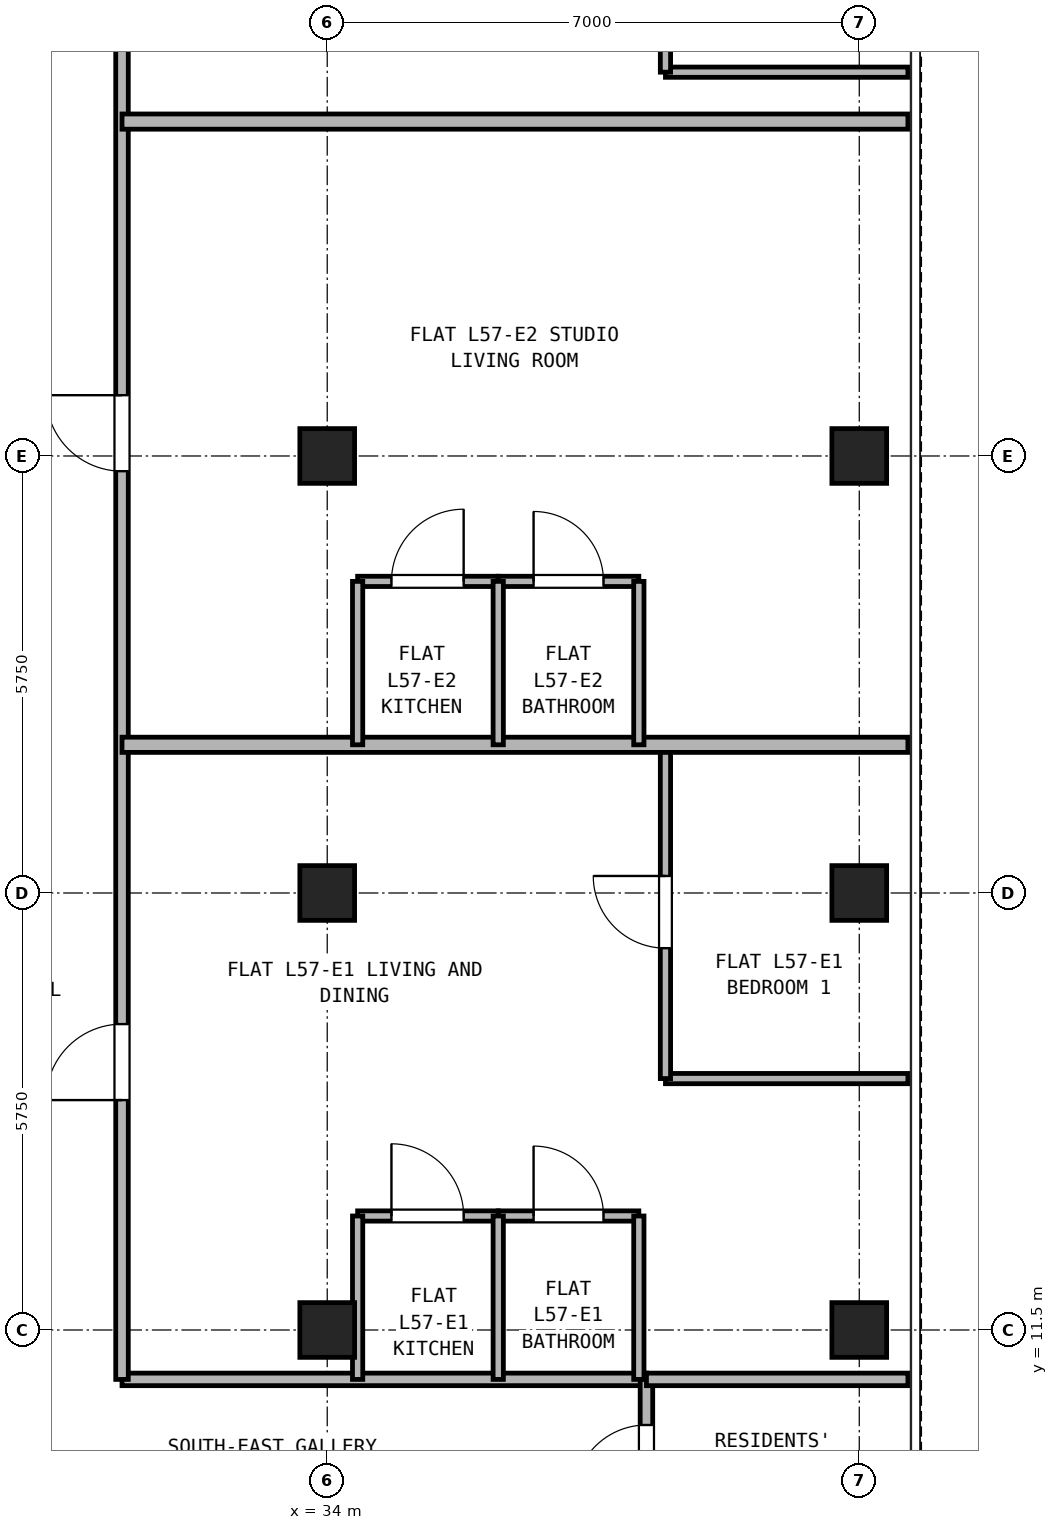
"""IFC4 building model, lengths in metres.
Left out: names, types, materials, properties, quantities, classifications, styles, units other than length and angle.
Written with IfcOpenShell. Run it as: python <this file> out.ifc"""

import sys

from ifc_helpers import new_model, si_unit, direction, frame, frame_2d, origin, origin_2d, place, context, subcontext, project, spatial, rectangle, hollow_rectangle, extrude, source, transform, mapped, element, fill, save


model = new_model("IFC4")
c1 = context("Model", 3, precision=1e-05, world=origin(), true_north=direction((0.0, 1.0)))
c2 = subcontext(c1, "Body", "Model", "MODEL_VIEW")
j1 = project(units=[si_unit("LENGTHUNIT", "METRE"), si_unit("PLANEANGLEUNIT", "RADIAN")], contexts=[c1])
p1 = place(None, origin())
s1 = spatial("IfcSite", under=j1, at=p1, CompositionType="ELEMENT")
p2 = place(p1, origin())
s2 = spatial("IfcBuilding", under=s1, at=p2, CompositionType="ELEMENT")
p3 = place(p2, frame((0.0, 0.0, 202.8)))
s3 = spatial("IfcBuildingStorey", under=s2, at=p3, CompositionType="ELEMENT", Elevation=202.8)
m1 = source(origin(), c2, "Body", "SweptSolid", [
    extrude(hollow_rectangle(XDim=0.72, YDim=0.72, WallThickness=0.04, at=origin_2d()), origin(), (0.0, 0.0, 1.0), 2.95),
])
for number, where, z_axis, x_axis in (
    (1, (41.0, 11.5, 0.0), (0.0, 0.0, 1.0), (1.0, 0.0, 0.0)),
    (2, (41.0, 17.25, 0.0), (0.0, 0.0, 1.0), (1.0, 0.0, 0.0)),
    (3, (41.0, 23.0, 0.0), (0.0, 0.0, 1.0), (1.0, 0.0, 0.0)),
    (4, (34.0, 11.5, 0.0), (0.0, 0.0, 1.0), (1.0, 0.0, 0.0)),
    (5, (34.0, 17.25, 0.0), (0.0, 0.0, 1.0), (1.0, 0.0, 0.0)),
    (6, (34.0, 23.0, 0.0), (0.0, 0.0, 1.0), (1.0, 0.0, 0.0)),
):
    element("IfcColumn", number, at=place(p3, frame(where, z_axis=z_axis, x_axis=x_axis)), inside=s3, PredefinedType="COLUMN", context=c2, shape_type="MappedRepresentation", body=[
        mapped(m1, transform((0.0, 0.0, 0.0), x_axis=(1.0, 0.0, 0.0), y_axis=(0.0, 1.0, 0.0), z_axis=(0.0, 0.0, 1.0), scale=1.0)),
    ])
p4 = place(p3, frame((31.3, 10.85, 0.0), z_axis=(0.0, 0.0, 1.0), x_axis=(1.0, 0.0, 0.0)))
e7 = element("IfcWall", 7, at=p4, inside=s3, PredefinedType="PARTITIONING", context=c2, shape_type="SweptSolid", body=[
    extrude(rectangle(XDim=6.9, YDim=0.165, at=frame_2d((3.45, 0.0))), origin(), (0.0, 0.0, 1.0), 2.95),
])
p5 = place(p3, frame((38.2, 8.85, 0.0), z_axis=(0.0, 0.0, 1.0), x_axis=(0.0, 1.0, 0.0)))
e8 = element("IfcWall", 8, at=p5, inside=s3, PredefinedType="PARTITIONING", context=c2, shape_type="SweptSolid", body=[
    extrude(rectangle(XDim=2.0, YDim=0.165, at=frame_2d((1.0, 0.0))), origin(), (0.0, 0.0, 1.0), 2.95),
])
p6 = place(p5, frame((0.45, 0.0, 0.0)))
e9 = element("IfcOpeningElement", 9, at=p6, cuts=e8, PredefinedType="OPENING", context=c2, shape_type="SweptSolid", body=[
    extrude(rectangle(XDim=0.95, YDim=2.15, at=frame_2d((0.475, 1.075))), frame((0.0, 0.093, 0.0), z_axis=(0.0, -1.0, 0.0), x_axis=(1.0, 0.0, 0.0)), (0.0, 0.0, 1.0), 0.185),
])
p7 = place(p3, frame((31.3, 10.85, 0.0), z_axis=(0.0, 0.0, 1.0), x_axis=(0.0, 1.0, 0.0)))
e10 = element("IfcWall", 10, at=p7, inside=s3, PredefinedType="PARTITIONING", context=c2, shape_type="SweptSolid", body=[
    extrude(rectangle(XDim=24.29, YDim=0.165, at=frame_2d((12.145, 0.0))), origin(), (0.0, 0.0, 1.0), 2.95),
])
p8 = place(p7, frame((3.675, 0.0, 0.0)))
e11 = element("IfcOpeningElement", 11, at=p8, cuts=e10, PredefinedType="OPENING", context=c2, shape_type="SweptSolid", body=[
    extrude(rectangle(XDim=1.0, YDim=2.15, at=frame_2d((0.5, 1.075))), frame((0.0, 0.093, 0.0), z_axis=(0.0, -1.0, 0.0), x_axis=(1.0, 0.0, 0.0)), (0.0, 0.0, 1.0), 0.185),
])
p9 = place(p7, frame((11.95, 0.0, 0.0)))
e12 = element("IfcOpeningElement", 12, at=p9, cuts=e10, PredefinedType="OPENING", context=c2, shape_type="SweptSolid", body=[
    extrude(rectangle(XDim=1.0, YDim=2.15, at=frame_2d((0.5, 1.075))), frame((0.0, 0.093, 0.0), z_axis=(0.0, -1.0, 0.0), x_axis=(1.0, 0.0, 0.0)), (0.0, 0.0, 1.0), 0.185),
])
p10 = place(p7, frame((17.75, 0.0, 0.0)))
e13 = element("IfcOpeningElement", 13, at=p10, cuts=e10, PredefinedType="OPENING", context=c2, shape_type="SweptSolid", body=[
    extrude(rectangle(XDim=1.0, YDim=2.15, at=frame_2d((0.5, 1.075))), frame((0.0, 0.093, 0.0), z_axis=(0.0, -1.0, 0.0), x_axis=(1.0, 0.0, 0.0)), (0.0, 0.0, 1.0), 0.185),
])
p11 = place(p3, frame((38.2, 10.85, 0.0), z_axis=(0.0, 0.0, 1.0), x_axis=(1.0, 0.0, 0.0)))
e14 = element("IfcWall", 14, at=p11, inside=s3, PredefinedType="PARTITIONING", context=c2, shape_type="SweptSolid", body=[
    extrude(rectangle(XDim=3.44, YDim=0.165, at=frame_2d((1.72, 0.0))), origin(), (0.0, 0.0, 1.0), 2.95),
])
p12 = place(p3, frame((34.4, 13.0, 0.0), z_axis=(0.0, 0.0, 1.0), x_axis=(1.0, 0.0, 0.0)))
e15 = element("IfcWall", 15, at=p12, inside=s3, PredefinedType="PARTITIONING", context=c2, shape_type="SweptSolid", body=[
    extrude(rectangle(XDim=1.85, YDim=0.135, at=frame_2d((0.925, 0.0))), origin(), (0.0, 0.0, 1.0), 2.95),
])
p13 = place(p12, frame((0.445, 0.0, 0.0)))
e16 = element("IfcOpeningElement", 16, at=p13, cuts=e15, PredefinedType="OPENING", context=c2, shape_type="SweptSolid", body=[
    extrude(rectangle(XDim=0.95, YDim=2.15, at=frame_2d((0.475, 1.075))), frame((0.0, 0.077, 0.0), z_axis=(0.0, -1.0, 0.0), x_axis=(1.0, 0.0, 0.0)), (0.0, 0.0, 1.0), 0.155),
])
p14 = place(p3, frame((36.25, 13.0, 0.0), z_axis=(0.0, 0.0, 1.0), x_axis=(1.0, 0.0, 0.0)))
e17 = element("IfcWall", 17, at=p14, inside=s3, PredefinedType="PARTITIONING", context=c2, shape_type="SweptSolid", body=[
    extrude(rectangle(XDim=1.85, YDim=0.135, at=frame_2d((0.925, 0.0))), origin(), (0.0, 0.0, 1.0), 2.95),
])
p15 = place(p14, frame((0.465, 0.0, 0.0)))
e18 = element("IfcOpeningElement", 18, at=p15, cuts=e17, PredefinedType="OPENING", context=c2, shape_type="SweptSolid", body=[
    extrude(rectangle(XDim=0.92, YDim=2.1, at=frame_2d((0.46, 1.05))), frame((0.0, 0.077, 0.0), z_axis=(0.0, -1.0, 0.0), x_axis=(1.0, 0.0, 0.0)), (0.0, 0.0, 1.0), 0.155),
])
for number, where, z_axis, x_axis in (
    (19, (34.4, 10.85, 0.0), (0.0, 0.0, 1.0), (0.0, 1.0, 0.0)),
    (20, (36.25, 10.85, 0.0), (0.0, 0.0, 1.0), (0.0, 1.0, 0.0)),
    (21, (38.1, 10.85, 0.0), (0.0, 0.0, 1.0), (0.0, 1.0, 0.0)),
):
    element("IfcWall", number, at=place(p3, frame(where, z_axis=z_axis, x_axis=x_axis)), inside=s3, PredefinedType="PARTITIONING", context=c2, shape_type="SweptSolid", body=[
        extrude(rectangle(XDim=2.15, YDim=0.135, at=frame_2d((1.075, 0.0))), origin(), (0.0, 0.0, 1.0), 2.95),
    ])
p16 = place(p3, frame((38.45, 14.808, 0.0), z_axis=(0.0, 0.0, 1.0), x_axis=(1.0, 0.0, 0.0)))
e22 = element("IfcWall", 22, at=p16, inside=s3, PredefinedType="PARTITIONING", context=c2, shape_type="SweptSolid", body=[
    extrude(rectangle(XDim=3.19, YDim=0.135, at=frame_2d((1.595, 0.0))), origin(), (0.0, 0.0, 1.0), 2.95),
])
p17 = place(p3, frame((38.45, 14.808, 0.0), z_axis=(0.0, 0.0, 1.0), x_axis=(0.0, 1.0, 0.0)))
e23 = element("IfcWall", 23, at=p17, inside=s3, PredefinedType="PARTITIONING", context=c2, shape_type="SweptSolid", body=[
    extrude(rectangle(XDim=4.392, YDim=0.135, at=frame_2d((2.196, 0.0))), origin(), (0.0, 0.0, 1.0), 2.95),
])
p18 = place(p17, frame((1.716, 0.0, 0.0)))
e24 = element("IfcOpeningElement", 24, at=p18, cuts=e23, PredefinedType="OPENING", context=c2, shape_type="SweptSolid", body=[
    extrude(rectangle(XDim=0.95, YDim=2.15, at=frame_2d((0.475, 1.075))), frame((0.0, 0.077, 0.0), z_axis=(0.0, -1.0, 0.0), x_axis=(1.0, 0.0, 0.0)), (0.0, 0.0, 1.0), 0.155),
])
p19 = place(p3, frame((31.3, 19.2, 0.0), z_axis=(0.0, 0.0, 1.0), x_axis=(1.0, 0.0, 0.0)))
e25 = element("IfcWall", 25, at=p19, inside=s3, PredefinedType="PARTITIONING", context=c2, shape_type="SweptSolid", body=[
    extrude(rectangle(XDim=10.34, YDim=0.2, at=frame_2d((5.17, 0.0))), origin(), (0.0, 0.0, 1.0), 2.95),
])
p20 = place(p3, frame((34.4, 21.35, 0.0), z_axis=(0.0, 0.0, 1.0), x_axis=(1.0, 0.0, 0.0)))
e26 = element("IfcWall", 26, at=p20, inside=s3, PredefinedType="PARTITIONING", context=c2, shape_type="SweptSolid", body=[
    extrude(rectangle(XDim=1.85, YDim=0.135, at=frame_2d((0.925, 0.0))), origin(), (0.0, 0.0, 1.0), 2.95),
])
p21 = place(p20, frame((0.445, 0.0, 0.0)))
e27 = element("IfcOpeningElement", 27, at=p21, cuts=e26, PredefinedType="OPENING", context=c2, shape_type="SweptSolid", body=[
    extrude(rectangle(XDim=0.95, YDim=2.15, at=frame_2d((0.475, 1.075))), frame((0.0, 0.077, 0.0), z_axis=(0.0, -1.0, 0.0), x_axis=(1.0, 0.0, 0.0)), (0.0, 0.0, 1.0), 0.155),
])
p22 = place(p3, frame((36.25, 21.35, 0.0), z_axis=(0.0, 0.0, 1.0), x_axis=(1.0, 0.0, 0.0)))
e28 = element("IfcWall", 28, at=p22, inside=s3, PredefinedType="PARTITIONING", context=c2, shape_type="SweptSolid", body=[
    extrude(rectangle(XDim=1.85, YDim=0.135, at=frame_2d((0.925, 0.0))), origin(), (0.0, 0.0, 1.0), 2.95),
])
p23 = place(p22, frame((0.465, 0.0, 0.0)))
e29 = element("IfcOpeningElement", 29, at=p23, cuts=e28, PredefinedType="OPENING", context=c2, shape_type="SweptSolid", body=[
    extrude(rectangle(XDim=0.92, YDim=2.1, at=frame_2d((0.46, 1.05))), frame((0.0, 0.077, 0.0), z_axis=(0.0, -1.0, 0.0), x_axis=(1.0, 0.0, 0.0)), (0.0, 0.0, 1.0), 0.155),
])
for number, where, z_axis, x_axis in (
    (30, (34.4, 19.2, 0.0), (0.0, 0.0, 1.0), (0.0, 1.0, 0.0)),
    (31, (36.25, 19.2, 0.0), (0.0, 0.0, 1.0), (0.0, 1.0, 0.0)),
    (32, (38.1, 19.2, 0.0), (0.0, 0.0, 1.0), (0.0, 1.0, 0.0)),
):
    element("IfcWall", number, at=place(p3, frame(where, z_axis=z_axis, x_axis=x_axis)), inside=s3, PredefinedType="PARTITIONING", context=c2, shape_type="SweptSolid", body=[
        extrude(rectangle(XDim=2.15, YDim=0.135, at=frame_2d((1.075, 0.0))), origin(), (0.0, 0.0, 1.0), 2.95),
    ])
p24 = place(p3, frame((31.3, 27.4, 0.0), z_axis=(0.0, 0.0, 1.0), x_axis=(1.0, 0.0, 0.0)))
e33 = element("IfcWall", 33, at=p24, inside=s3, PredefinedType="PARTITIONING", context=c2, shape_type="SweptSolid", body=[
    extrude(rectangle(XDim=10.34, YDim=0.2, at=frame_2d((5.17, 0.0))), origin(), (0.0, 0.0, 1.0), 2.95),
])
p25 = place(p3, frame((38.45, 28.05, 0.0), z_axis=(0.0, 0.0, 1.0), x_axis=(1.0, 0.0, 0.0)))
e34 = element("IfcWall", 34, at=p25, inside=s3, PredefinedType="PARTITIONING", context=c2, shape_type="SweptSolid", body=[
    extrude(rectangle(XDim=3.19, YDim=0.135, at=frame_2d((1.595, 0.0))), origin(), (0.0, 0.0, 1.0), 2.95),
])
p26 = place(p3, frame((38.45, 28.05, 0.0), z_axis=(0.0, 0.0, 1.0), x_axis=(0.0, 1.0, 0.0)))
e35 = element("IfcWall", 35, at=p26, inside=s3, PredefinedType="PARTITIONING", context=c2, shape_type="SweptSolid", body=[
    extrude(rectangle(XDim=3.4, YDim=0.135, at=frame_2d((1.7, 0.0))), origin(), (0.0, 0.0, 1.0), 2.95),
])
p27 = place(p26, frame((1.22, 0.0, 0.0)))
e36 = element("IfcOpeningElement", 36, at=p27, cuts=e35, PredefinedType="OPENING", context=c2, shape_type="SweptSolid", body=[
    extrude(rectangle(XDim=0.95, YDim=2.15, at=frame_2d((0.475, 1.075))), frame((0.0, 0.077, 0.0), z_axis=(0.0, -1.0, 0.0), x_axis=(1.0, 0.0, 0.0)), (0.0, 0.0, 1.0), 0.155),
])
p28 = place(p6, origin())
e37 = element("IfcDoor", 37, at=p28, inside=s3, OperationType="SINGLE_SWING_LEFT", PredefinedType="DOOR", context=c2, shape_type="SweptSolid", body=[
    extrude(rectangle(XDim=0.95, YDim=2.15, at=frame_2d((0.475, 1.075))), frame((0.0, 0.025, 0.0), z_axis=(0.0, -1.0, 0.0), x_axis=(1.0, 0.0, 0.0)), (0.0, 0.0, 1.0), 0.05),
])
fill(e9, e37)
p29 = place(p13, origin())
e38 = element("IfcDoor", 38, at=p29, inside=s3, OperationType="SINGLE_SWING_LEFT", PredefinedType="DOOR", context=c2, shape_type="SweptSolid", body=[
    extrude(rectangle(XDim=0.95, YDim=2.15, at=frame_2d((0.475, 1.075))), frame((0.0, 0.025, 0.0), z_axis=(0.0, -1.0, 0.0), x_axis=(1.0, 0.0, 0.0)), (0.0, 0.0, 1.0), 0.05),
])
fill(e16, e38)
p30 = place(p15, origin())
e39 = element("IfcDoor", 39, at=p30, inside=s3, OperationType="SINGLE_SWING_LEFT", PredefinedType="DOOR", context=c2, shape_type="SweptSolid", body=[
    extrude(rectangle(XDim=0.92, YDim=2.1, at=frame_2d((0.46, 1.05))), frame((0.0, 0.025, 0.0), z_axis=(0.0, -1.0, 0.0), x_axis=(1.0, 0.0, 0.0)), (0.0, 0.0, 1.0), 0.05),
])
fill(e18, e39)
p31 = place(p18, frame((0.95, 0.0, 0.0), z_axis=(0.0, 0.0, 1.0), x_axis=(-1.0, 0.0, 0.0)))
e40 = element("IfcDoor", 40, at=p31, inside=s3, OperationType="SINGLE_SWING_RIGHT", PredefinedType="DOOR", context=c2, shape_type="SweptSolid", body=[
    extrude(rectangle(XDim=0.95, YDim=2.15, at=frame_2d((0.475, 1.075))), frame((0.0, 0.025, 0.0), z_axis=(0.0, -1.0, 0.0), x_axis=(1.0, 0.0, 0.0)), (0.0, 0.0, 1.0), 0.05),
])
fill(e24, e40)
p32 = place(p8, frame((1.0, 0.0, 0.0), z_axis=(0.0, 0.0, 1.0), x_axis=(-1.0, 0.0, 0.0)))
e41 = element("IfcDoor", 41, at=p32, inside=s3, OperationType="SINGLE_SWING_LEFT", PredefinedType="DOOR", context=c2, shape_type="SweptSolid", body=[
    extrude(rectangle(XDim=1.0, YDim=2.15, at=frame_2d((0.5, 1.075))), frame((0.0, 0.025, 0.0), z_axis=(0.0, -1.0, 0.0), x_axis=(1.0, 0.0, 0.0)), (0.0, 0.0, 1.0), 0.05),
])
fill(e11, e41)
p33 = place(p21, origin())
e42 = element("IfcDoor", 42, at=p33, inside=s3, OperationType="SINGLE_SWING_RIGHT", PredefinedType="DOOR", context=c2, shape_type="SweptSolid", body=[
    extrude(rectangle(XDim=0.95, YDim=2.15, at=frame_2d((0.475, 1.075))), frame((0.0, 0.025, 0.0), z_axis=(0.0, -1.0, 0.0), x_axis=(1.0, 0.0, 0.0)), (0.0, 0.0, 1.0), 0.05),
])
fill(e27, e42)
p34 = place(p23, origin())
e43 = element("IfcDoor", 43, at=p34, inside=s3, OperationType="SINGLE_SWING_LEFT", PredefinedType="DOOR", context=c2, shape_type="SweptSolid", body=[
    extrude(rectangle(XDim=0.92, YDim=2.1, at=frame_2d((0.46, 1.05))), frame((0.0, 0.025, 0.0), z_axis=(0.0, -1.0, 0.0), x_axis=(1.0, 0.0, 0.0)), (0.0, 0.0, 1.0), 0.05),
])
fill(e29, e43)
p35 = place(p9, frame((1.0, 0.0, 0.0), z_axis=(0.0, 0.0, 1.0), x_axis=(-1.0, 0.0, 0.0)))
e44 = element("IfcDoor", 44, at=p35, inside=s3, OperationType="SINGLE_SWING_RIGHT", PredefinedType="DOOR", context=c2, shape_type="SweptSolid", body=[
    extrude(rectangle(XDim=1.0, YDim=2.15, at=frame_2d((0.5, 1.075))), frame((0.0, 0.025, 0.0), z_axis=(0.0, -1.0, 0.0), x_axis=(1.0, 0.0, 0.0)), (0.0, 0.0, 1.0), 0.05),
])
fill(e12, e44)
save(model, sys.argv[1])
